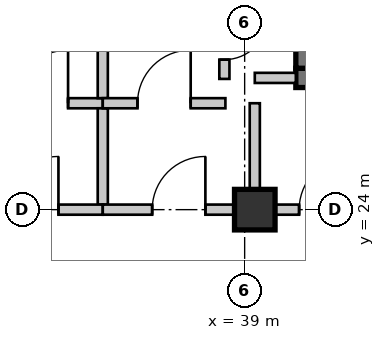
"""IFC4 building model, lengths in metres.
Left out: names, types, materials, properties, quantities, classifications, styles, units other than length and angle.
Written with IfcOpenShell. Run it as: python <this file> out.ifc"""

import sys

from ifc_helpers import new_model, si_unit, direction, frame, frame_2d, origin, origin_2d, place, context, subcontext, project, spatial, rectangle, extrude, source, transform, mapped, element, fill, save


model = new_model("IFC4")
c1 = context("Model", 3, precision=1e-05, world=origin(), true_north=direction((0.0, 1.0)))
c2 = subcontext(c1, "Body", "Model", "MODEL_VIEW")
j1 = project(units=[si_unit("LENGTHUNIT", "METRE"), si_unit("PLANEANGLEUNIT", "RADIAN")], contexts=[c1])
p1 = place(None, origin())
s1 = spatial("IfcSite", under=j1, at=p1, CompositionType="ELEMENT")
p2 = place(p1, origin())
s2 = spatial("IfcBuilding", under=s1, at=p2, CompositionType="ELEMENT")
p3 = place(p2, frame((0.0, 0.0, 26.25)))
s3 = spatial("IfcBuildingStorey", under=s2, at=p3, CompositionType="ELEMENT", Elevation=26.25)
m1 = source(origin(), c2, "Body", "SweptSolid", [
    extrude(rectangle(XDim=0.8, YDim=0.8, at=origin_2d()), origin(), (0.0, 0.0, 1.0), 3.15),
])
p4 = place(p3, frame((39.2, 24.0, 0.0), z_axis=(0.0, 0.0, 1.0), x_axis=(1.0, 0.0, 0.0)))
e1 = element("IfcColumn", 1, at=p4, inside=s3, PredefinedType="COLUMN", context=c2, shape_type="MappedRepresentation", body=[
    mapped(m1, transform((0.0, 0.0, 0.0), scale=1.0)),
])
m2 = source(origin(), c2, "Body", "SweptSolid", [
    extrude(rectangle(XDim=1.51, YDim=0.38, at=frame_2d((0.755, 0.0))), origin(), (0.0, 0.0, 1.0), 2.93),
])
p5 = place(p3, frame((40.01, 26.6, 0.0), z_axis=(0.0, 0.0, 1.0), x_axis=(1.0, 0.0, 0.0)))
e2 = element("IfcWall", 2, at=p5, inside=s3, PredefinedType="SHEAR", context=c2, shape_type="MappedRepresentation", body=[
    mapped(m2, transform((0.0, 0.0, 0.0), scale=1.0)),
])
m3 = source(origin(), c2, "Body", "SweptSolid", [
    extrude(rectangle(XDim=1.22, YDim=0.38, at=frame_2d((0.61, 0.0))), origin(), (0.0, 0.0, 1.0), 2.93),
])
p6 = place(p3, frame((40.2, 28.01, 0.0), z_axis=(0.0, 0.0, 1.0), x_axis=(0.0, -1.0, 0.0)))
e3 = element("IfcWall", 3, at=p6, inside=s3, PredefinedType="SHEAR", context=c2, shape_type="MappedRepresentation", body=[
    mapped(m3, transform((0.0, 0.0, 0.0), scale=1.0)),
])
m4 = source(origin(), c2, "Body", "SweptSolid", [
    extrude(rectangle(XDim=2.42, YDim=0.2, at=frame_2d((1.21, 0.0))), origin(), (0.0, 0.0, 1.0), 2.93),
])
p7 = place(p3, frame((33.78, 26.1, 0.0), z_axis=(0.0, 0.0, 1.0), x_axis=(1.0, 0.0, 0.0)))
e4 = element("IfcWall", 4, at=p7, inside=s3, PredefinedType="SOLIDWALL", context=c2, shape_type="MappedRepresentation", body=[
    mapped(m4, transform((0.0, 0.0, 0.0), scale=1.0)),
])
m5 = source(origin(), c2, "Body", "SweptSolid", [
    extrude(rectangle(XDim=1.05, YDim=2.1, at=frame_2d((0.525, 1.05))), frame((0.0, 0.11, 0.0), z_axis=(0.0, -1.0, 0.0), x_axis=(1.0, 0.0, 0.0)), (0.0, 0.0, 1.0), 0.22),
])
p8 = place(p7, frame((0.685, 0.0, 0.0)))
e5 = element("IfcOpeningElement", 5, at=p8, cuts=e4, PredefinedType="OPENING", context=c2, shape_type="MappedRepresentation", body=[
    mapped(m5, transform((0.0, 0.0, 0.0), scale=1.0)),
])
m6 = source(origin(), c2, "Body", "SweptSolid", [
    extrude(rectangle(XDim=1.9, YDim=0.2, at=frame_2d((0.95, 0.0))), origin(), (0.0, 0.0, 1.0), 2.93),
])
p9 = place(p3, frame((36.2, 26.0, 0.0), z_axis=(0.0, 0.0, 1.0), x_axis=(0.0, -1.0, 0.0)))
e6 = element("IfcWall", 6, at=p9, inside=s3, PredefinedType="SOLIDWALL", context=c2, shape_type="MappedRepresentation", body=[
    mapped(m6, transform((0.0, 0.0, 0.0), scale=1.0)),
])
m7 = source(origin(), c2, "Body", "SweptSolid", [
    extrude(rectangle(XDim=2.8, YDim=0.2, at=frame_2d((1.4, 0.0))), origin(), (0.0, 0.0, 1.0), 2.47),
])
p10 = place(p3, frame((36.2, 24.0, 0.0), z_axis=(0.0, 0.0, 1.0), x_axis=(-1.0, 0.0, 0.0)))
e7 = element("IfcWall", 7, at=p10, inside=s3, PredefinedType="SOLIDWALL", context=c2, shape_type="MappedRepresentation", body=[
    mapped(m7, transform((0.0, 0.0, 0.0), scale=1.0)),
])
p11 = place(p10, frame((0.875, 0.0, 0.0)))
e8 = element("IfcOpeningElement", 8, at=p11, cuts=e7, PredefinedType="OPENING", context=c2, shape_type="MappedRepresentation", body=[
    mapped(m5, transform((0.0, 0.0, 0.0), scale=1.0)),
])
m8 = source(origin(), c2, "Body", "SweptSolid", [
    extrude(rectangle(XDim=1.9, YDim=0.2, at=frame_2d((0.95, 0.0))), origin(), (0.0, 0.0, 1.0), 2.93),
])
p12 = place(p3, frame((36.2, 28.1, 0.0), z_axis=(0.0, 0.0, 1.0), x_axis=(0.0, -1.0, 0.0)))
e9 = element("IfcWall", 9, at=p12, inside=s3, PredefinedType="SOLIDWALL", context=c2, shape_type="MappedRepresentation", body=[
    mapped(m8, transform((0.0, 0.0, 0.0), scale=1.0)),
])
m9 = source(origin(), c2, "Body", "SweptSolid", [
    extrude(rectangle(XDim=2.42, YDim=0.2, at=frame_2d((1.21, 0.0))), origin(), (0.0, 0.0, 1.0), 2.93),
])
p13 = place(p3, frame((36.2, 26.1, 0.0), z_axis=(0.0, 0.0, 1.0), x_axis=(1.0, 0.0, 0.0)))
e10 = element("IfcWall", 10, at=p13, inside=s3, PredefinedType="SOLIDWALL", context=c2, shape_type="MappedRepresentation", body=[
    mapped(m9, transform((0.0, 0.0, 0.0), scale=1.0)),
])
p14 = place(p13, frame((0.685, 0.0, 0.0)))
e11 = element("IfcOpeningElement", 11, at=p14, cuts=e10, PredefinedType="OPENING", context=c2, shape_type="MappedRepresentation", body=[
    mapped(m5, transform((0.0, 0.0, 0.0), scale=1.0)),
])
m10 = source(origin(), c2, "Body", "SweptSolid", [
    extrude(rectangle(XDim=2.0, YDim=0.2, at=frame_2d((1.0, 0.0))), origin(), (0.0, 0.0, 1.0), 2.47),
])
p15 = place(p3, frame((39.2, 26.1, 0.0), z_axis=(0.0, 0.0, 1.0), x_axis=(0.0, -1.0, 0.0)))
e12 = element("IfcWall", 12, at=p15, inside=s3, PredefinedType="SOLIDWALL", context=c2, shape_type="MappedRepresentation", body=[
    mapped(m10, transform((0.0, 0.0, 0.0), scale=1.0)),
])
m11 = source(origin(), c2, "Body", "SweptSolid", [
    extrude(rectangle(XDim=3.0, YDim=0.2, at=frame_2d((1.5, 0.0))), origin(), (0.0, 0.0, 1.0), 2.47),
])
p16 = place(p3, frame((39.2, 24.0, 0.0), z_axis=(0.0, 0.0, 1.0), x_axis=(-1.0, 0.0, 0.0)))
e13 = element("IfcWall", 13, at=p16, inside=s3, PredefinedType="SOLIDWALL", context=c2, shape_type="MappedRepresentation", body=[
    mapped(m11, transform((0.0, 0.0, 0.0), scale=1.0)),
])
p17 = place(p16, frame((0.975, 0.0, 0.0)))
e14 = element("IfcOpeningElement", 14, at=p17, cuts=e13, PredefinedType="OPENING", context=c2, shape_type="MappedRepresentation", body=[
    mapped(m5, transform((0.0, 0.0, 0.0), scale=1.0)),
])
m12 = source(origin(), c2, "Body", "SweptSolid", [
    extrude(rectangle(XDim=1.43, YDim=0.2, at=frame_2d((0.715, 0.0))), origin(), (0.0, 0.0, 1.0), 2.93),
])
p18 = place(p3, frame((38.6, 28.01, 0.0), z_axis=(0.0, 0.0, 1.0), x_axis=(0.0, -1.0, 0.0)))
e15 = element("IfcWall", 15, at=p18, inside=s3, PredefinedType="SOLIDWALL", context=c2, shape_type="MappedRepresentation", body=[
    mapped(m12, transform((0.0, 0.0, 0.0), scale=1.0)),
])
m13 = source(origin(), c2, "Body", "SweptSolid", [
    extrude(rectangle(XDim=0.86, YDim=2.1, at=frame_2d((0.43, 1.05))), frame((0.0, 0.11, 0.0), z_axis=(0.0, -1.0, 0.0), x_axis=(1.0, 0.0, 0.0)), (0.0, 0.0, 1.0), 0.22),
])
p19 = place(p18, frame((0.19, 0.0, 0.0)))
e16 = element("IfcOpeningElement", 16, at=p19, cuts=e15, PredefinedType="OPENING", context=c2, shape_type="MappedRepresentation", body=[
    mapped(m13, transform((0.0, 0.0, 0.0), scale=1.0)),
])
m14 = source(origin(), c2, "Body", "SweptSolid", [
    extrude(rectangle(XDim=0.81, YDim=0.2, at=frame_2d((0.405, 0.0))), origin(), (0.0, 0.0, 1.0), 2.93),
])
p20 = place(p3, frame((39.2, 26.6, 0.0), z_axis=(0.0, 0.0, 1.0), x_axis=(1.0, 0.0, 0.0)))
e17 = element("IfcWall", 17, at=p20, inside=s3, PredefinedType="SOLIDWALL", context=c2, shape_type="MappedRepresentation", body=[
    mapped(m14, transform((0.0, 0.0, 0.0), scale=1.0)),
])
m15 = source(origin(), c2, "Body", "SweptSolid", [
    extrude(rectangle(XDim=2.3, YDim=0.2, at=frame_2d((1.15, 0.0))), origin(), (0.0, 0.0, 1.0), 2.397),
])
p21 = place(p3, frame((41.5, 24.0, 0.0), z_axis=(0.0, 0.0, 1.0), x_axis=(-1.0, 0.0, 0.0)))
e18 = element("IfcWall", 18, at=p21, inside=s3, PredefinedType="SOLIDWALL", context=c2, shape_type="MappedRepresentation", body=[
    mapped(m15, transform((0.0, 0.0, 0.0), scale=1.0)),
])
p22 = place(p21, frame((0.375, 0.0, 0.0)))
e19 = element("IfcOpeningElement", 19, at=p22, cuts=e18, PredefinedType="OPENING", context=c2, shape_type="MappedRepresentation", body=[
    mapped(m5, transform((0.0, 0.0, 0.0), scale=1.0)),
])
m16 = source(origin(), c2, "Body", "SweptSolid", [
    extrude(rectangle(XDim=1.05, YDim=2.1, at=frame_2d((0.525, 1.05))), frame((0.0, 0.025, 0.0), z_axis=(0.0, -1.0, 0.0), x_axis=(1.0, 0.0, 0.0)), (0.0, 0.0, 1.0), 0.05),
])
p23 = place(p8, origin())
e20 = element("IfcDoor", 20, at=p23, inside=s3, OperationType="SINGLE_SWING_RIGHT", PredefinedType="DOOR", context=c2, shape_type="MappedRepresentation", body=[
    mapped(m16, transform((0.0, 0.0, 0.0), scale=1.0)),
])
fill(e5, e20)
p24 = place(p11, frame((1.05, 0.0, 0.0), z_axis=(0.0, 0.0, 1.0), x_axis=(-1.0, 0.0, 0.0)))
e21 = element("IfcDoor", 21, at=p24, inside=s3, OperationType="SINGLE_SWING_RIGHT", PredefinedType="DOOR", context=c2, shape_type="MappedRepresentation", body=[
    mapped(m16, transform((0.0, 0.0, 0.0), scale=1.0)),
])
fill(e8, e21)
p25 = place(p14, origin())
e22 = element("IfcDoor", 22, at=p25, inside=s3, OperationType="SINGLE_SWING_RIGHT", PredefinedType="DOOR", context=c2, shape_type="MappedRepresentation", body=[
    mapped(m16, transform((0.0, 0.0, 0.0), scale=1.0)),
])
fill(e11, e22)
p26 = place(p17, frame((1.05, 0.0, 0.0), z_axis=(0.0, 0.0, 1.0), x_axis=(-1.0, 0.0, 0.0)))
e23 = element("IfcDoor", 23, at=p26, inside=s3, OperationType="SINGLE_SWING_RIGHT", PredefinedType="DOOR", context=c2, shape_type="MappedRepresentation", body=[
    mapped(m16, transform((0.0, 0.0, 0.0), scale=1.0)),
])
fill(e14, e23)
p27 = place(p22, frame((1.05, 0.0, 0.0), z_axis=(0.0, 0.0, 1.0), x_axis=(-1.0, 0.0, 0.0)))
e24 = element("IfcDoor", 24, at=p27, inside=s3, OperationType="SINGLE_SWING_RIGHT", PredefinedType="DOOR", context=c2, shape_type="MappedRepresentation", body=[
    mapped(m16, transform((0.0, 0.0, 0.0), scale=1.0)),
])
fill(e19, e24)
m17 = source(origin(), c2, "Body", "SweptSolid", [
    extrude(rectangle(XDim=0.86, YDim=2.1, at=frame_2d((0.43, 1.05))), frame((0.0, 0.025, 0.0), z_axis=(0.0, -1.0, 0.0), x_axis=(1.0, 0.0, 0.0)), (0.0, 0.0, 1.0), 0.05),
])
p28 = place(p19, origin())
e25 = element("IfcDoor", 25, at=p28, inside=s3, OperationType="SINGLE_SWING_LEFT", PredefinedType="DOOR", context=c2, shape_type="MappedRepresentation", body=[
    mapped(m17, transform((0.0, 0.0, 0.0), scale=1.0)),
])
fill(e16, e25)
save(model, sys.argv[1])
